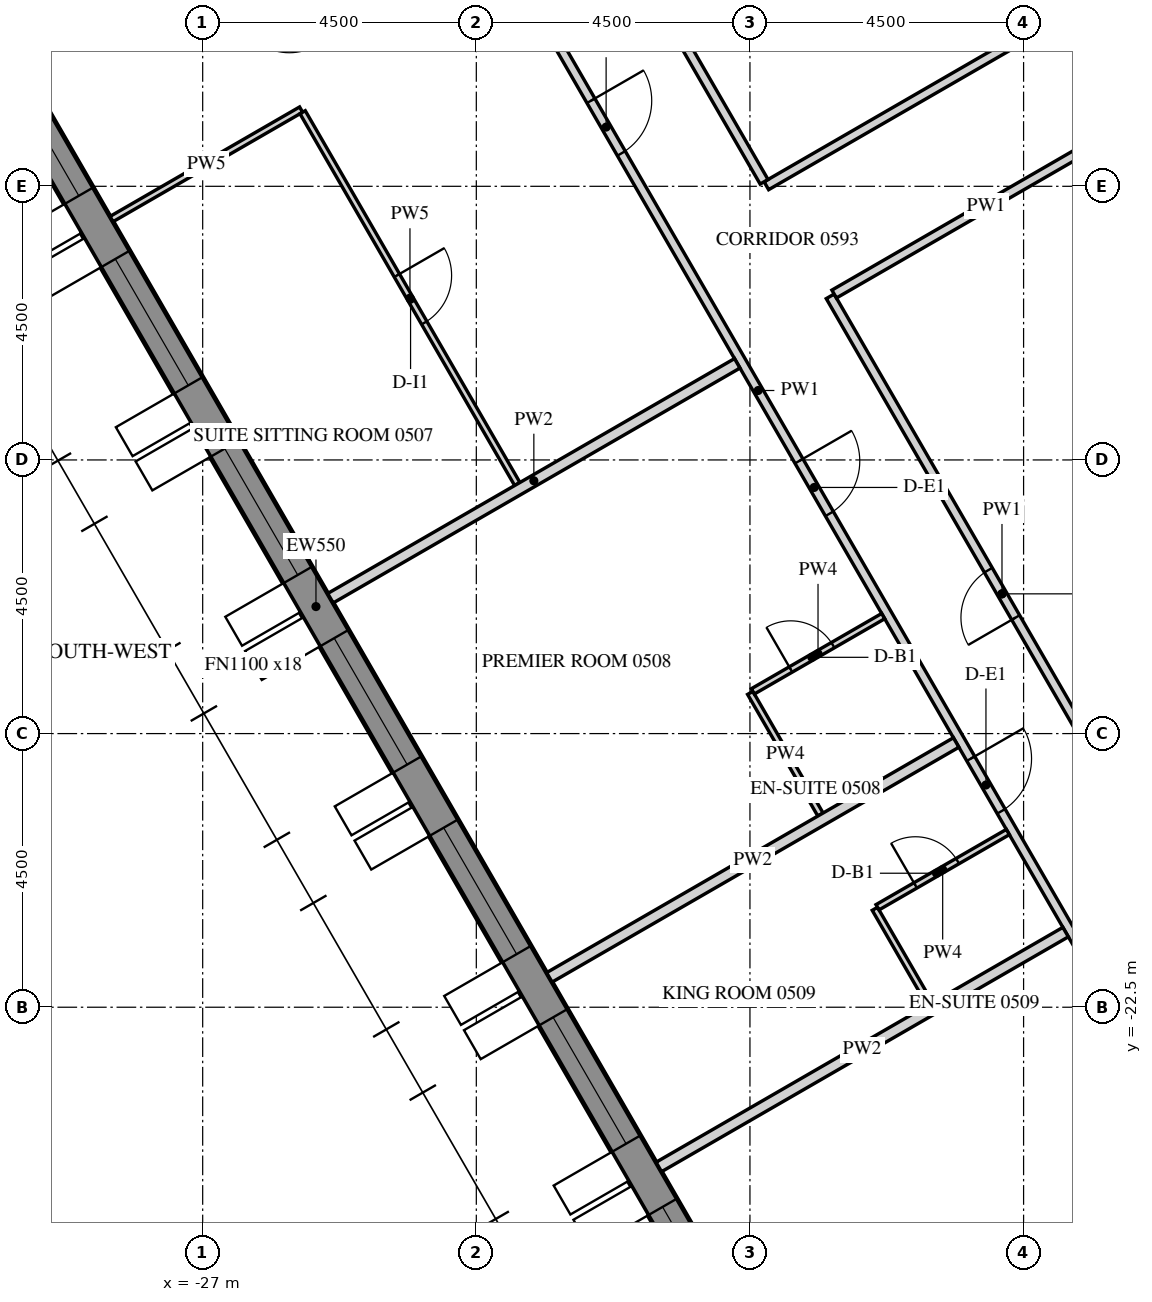
"""IFC4 building model, lengths in metres.
Left out: names, types, materials, properties, quantities, classifications, styles, units other than length and angle.
Written with IfcOpenShell. Run it as: python <this file> out.ifc"""

import sys

from ifc_helpers import new_model, si_unit, direction, frame, frame_2d, origin, place, context, subcontext, project, spatial, polyline, rectangle, outline, extrude, element, fill, save


model = new_model("IFC4")
c1 = context("Model", 3, precision=1e-05, world=origin(), true_north=direction((0.0, 1.0)))
c2 = subcontext(c1, "Body", "Model", "MODEL_VIEW")
j1 = project(units=[si_unit("LENGTHUNIT", "METRE"), si_unit("PLANEANGLEUNIT", "RADIAN")], contexts=[c1])
p1 = place(None, origin())
s1 = spatial("IfcSite", under=j1, at=p1, CompositionType="ELEMENT")
p2 = place(p1, origin())
s2 = spatial("IfcBuilding", under=s1, at=p2, CompositionType="ELEMENT")
p3 = place(p2, frame((0.0, 0.0, 80.4)))
s3 = spatial("IfcBuildingStorey", under=s2, at=p3, CompositionType="ELEMENT", Elevation=80.4)
p4 = place(p3, frame((-32.655, -2.89, -0.15), z_axis=(0.0, 0.0, 1.0), x_axis=(0.499997711317, -0.866026725152, 0.0)))
e1 = element("IfcWall", 1, at=p4, inside=s3, PredefinedType="SOLIDWALL", context=c2, shape_type="SweptSolid", body=[
    extrude(outline(polyline([(-0.022, -0.275), (30.097, -0.275), (30.045, 0.275), (0.022, 0.275), (-0.022, -0.275)])), origin(), (0.0, 0.0, 1.0), 3.9),
])
p5 = place(p4, frame((1.236, 0.0, 1.05)))
e2 = element("IfcOpeningElement", 2, at=p5, cuts=e1, PredefinedType="OPENING", context=c2, shape_type="SweptSolid", body=[
    extrude(rectangle(XDim=2.4, YDim=2.4, at=frame_2d((1.2, 1.2))), frame((0.0, 0.285, 0.0), z_axis=(0.0, -1.0, 0.0), x_axis=(1.0, 0.0, 0.0)), (0.0, 0.0, 1.0), 0.57),
])
p6 = place(p4, frame((4.835, 0.0, 1.05)))
e3 = element("IfcOpeningElement", 3, at=p6, cuts=e1, PredefinedType="OPENING", context=c2, shape_type="SweptSolid", body=[
    extrude(rectangle(XDim=2.4, YDim=2.4, at=frame_2d((1.2, 1.2))), frame((0.0, 0.285, 0.0), z_axis=(0.0, -1.0, 0.0), x_axis=(1.0, 0.0, 0.0)), (0.0, 0.0, 1.0), 0.57),
])
p7 = place(p4, frame((8.436, 0.0, 1.05)))
e4 = element("IfcOpeningElement", 4, at=p7, cuts=e1, PredefinedType="OPENING", context=c2, shape_type="SweptSolid", body=[
    extrude(rectangle(XDim=2.4, YDim=2.4, at=frame_2d((1.2, 1.2))), frame((0.0, 0.285, 0.0), z_axis=(0.0, -1.0, 0.0), x_axis=(1.0, 0.0, 0.0)), (0.0, 0.0, 1.0), 0.57),
])
p8 = place(p4, frame((12.035, 0.0, 1.05)))
e5 = element("IfcOpeningElement", 5, at=p8, cuts=e1, PredefinedType="OPENING", context=c2, shape_type="SweptSolid", body=[
    extrude(rectangle(XDim=2.4, YDim=2.4, at=frame_2d((1.2, 1.2))), frame((0.0, 0.285, 0.0), z_axis=(0.0, -1.0, 0.0), x_axis=(1.0, 0.0, 0.0)), (0.0, 0.0, 1.0), 0.57),
])
p9 = place(p4, frame((15.635, 0.0, 1.05)))
e6 = element("IfcOpeningElement", 6, at=p9, cuts=e1, PredefinedType="OPENING", context=c2, shape_type="SweptSolid", body=[
    extrude(rectangle(XDim=2.4, YDim=2.4, at=frame_2d((1.2, 1.2))), frame((0.0, 0.285, 0.0), z_axis=(0.0, -1.0, 0.0), x_axis=(1.0, 0.0, 0.0)), (0.0, 0.0, 1.0), 0.57),
])
p10 = place(p4, frame((19.236, 0.0, 1.05)))
e7 = element("IfcOpeningElement", 7, at=p10, cuts=e1, PredefinedType="OPENING", context=c2, shape_type="SweptSolid", body=[
    extrude(rectangle(XDim=2.4, YDim=2.4, at=frame_2d((1.2, 1.2))), frame((0.0, 0.285, 0.0), z_axis=(0.0, -1.0, 0.0), x_axis=(1.0, 0.0, 0.0)), (0.0, 0.0, 1.0), 0.57),
])
p11 = place(p4, frame((22.835, 0.0, 1.05)))
e8 = element("IfcOpeningElement", 8, at=p11, cuts=e1, PredefinedType="OPENING", context=c2, shape_type="SweptSolid", body=[
    extrude(rectangle(XDim=2.4, YDim=2.4, at=frame_2d((1.2, 1.2))), frame((0.0, 0.285, 0.0), z_axis=(0.0, -1.0, 0.0), x_axis=(1.0, 0.0, 0.0)), (0.0, 0.0, 1.0), 0.57),
])
p12 = place(p4, frame((26.436, 0.0, 1.05)))
e9 = element("IfcOpeningElement", 9, at=p12, cuts=e1, PredefinedType="OPENING", context=c2, shape_type="SweptSolid", body=[
    extrude(rectangle(XDim=2.4, YDim=2.4, at=frame_2d((1.2, 1.2))), frame((0.0, 0.285, 0.0), z_axis=(0.0, -1.0, 0.0), x_axis=(1.0, 0.0, 0.0)), (0.0, 0.0, 1.0), 0.57),
])
p13 = place(p3, frame((-15.819, 0.0, -0.15), z_axis=(0.0, 0.0, 1.0), x_axis=(0.499999880136, -0.866025472988, 0.0)))
e10 = element("IfcWall", 10, at=p13, inside=s3, PredefinedType="SHEAR", context=c2, shape_type="SweptSolid", body=[
    extrude(outline(polyline([(-0.173, -0.3), (15.993, -0.3), (15.646, 0.3), (0.173, 0.3), (-0.173, -0.3)])), origin(), (0.0, 0.0, 1.0), 3.9),
])
p14 = place(p13, frame((6.981, 0.0, 0.15)))
e11 = element("IfcOpeningElement", 11, at=p14, cuts=e10, PredefinedType="OPENING", context=c2, shape_type="SweptSolid", body=[
    extrude(rectangle(XDim=1.8, YDim=2.4, at=frame_2d((0.9, 1.2))), frame((0.0, 0.31, 0.0), z_axis=(0.0, -1.0, 0.0), x_axis=(1.0, 0.0, 0.0)), (0.0, 0.0, 1.0), 0.62),
])
p15 = place(p3, frame((-23.743, -2.175, 0.0), z_axis=(0.0, 0.0, 1.0), x_axis=(0.499992353047, -0.86602981871, 0.0)))
e12 = element("IfcWall", 12, at=p15, inside=s3, PredefinedType="PARTITIONING", context=c2, shape_type="SweptSolid", body=[
    extrude(rectangle(XDim=23.516, YDim=0.15, at=frame_2d((11.758, 0.0))), origin(), (0.0, 0.0, 1.0), 2.988),
])
p16 = place(p15, frame((6.256, 0.0, 0.0)))
e13 = element("IfcOpeningElement", 13, at=p16, cuts=e12, PredefinedType="OPENING", context=c2, shape_type="SweptSolid", body=[
    extrude(rectangle(XDim=1.0, YDim=2.1, at=frame_2d((0.5, 1.05))), frame((0.0, 0.085, 0.0), z_axis=(0.0, -1.0, 0.0), x_axis=(1.0, 0.0, 0.0)), (0.0, 0.0, 1.0), 0.17),
])
p17 = place(p15, frame((13.099, 0.0, 0.0)))
e14 = element("IfcOpeningElement", 14, at=p17, cuts=e12, PredefinedType="OPENING", context=c2, shape_type="SweptSolid", body=[
    extrude(rectangle(XDim=1.0, YDim=2.1, at=frame_2d((0.5, 1.05))), frame((0.0, 0.085, 0.0), z_axis=(0.0, -1.0, 0.0), x_axis=(1.0, 0.0, 0.0)), (0.0, 0.0, 1.0), 0.17),
])
p18 = place(p15, frame((18.749, 0.0, 0.0)))
e15 = element("IfcOpeningElement", 15, at=p18, cuts=e12, PredefinedType="OPENING", context=c2, shape_type="SweptSolid", body=[
    extrude(rectangle(XDim=1.0, YDim=2.1, at=frame_2d((0.5, 1.05))), frame((0.0, 0.085, 0.0), z_axis=(0.0, -1.0, 0.0), x_axis=(1.0, 0.0, 0.0)), (0.0, 0.0, 1.0), 0.17),
])
p19 = place(p3, frame((-12.664, -6.066, 0.0), z_axis=(0.0, 0.0, 1.0), x_axis=(-0.866018092707, -0.500012662943, 0.0)))
e16 = element("IfcWall", 16, at=p19, inside=s3, PredefinedType="PARTITIONING", context=c2, shape_type="SweptSolid", body=[
    extrude(rectangle(XDim=5.85, YDim=0.15, at=frame_2d((2.925, 0.0))), origin(), (0.0, 0.0, 1.0), 2.988),
])
p20 = place(p3, frame((-17.768, -8.926, 0.0), z_axis=(0.0, 0.0, 1.0), x_axis=(-0.499997033681, 0.866027116383, 0.0)))
e17 = element("IfcWall", 17, at=p20, inside=s3, PredefinedType="PARTITIONING", context=c2, shape_type="SweptSolid", body=[
    extrude(rectangle(XDim=8.235, YDim=0.15, at=frame_2d((4.118, 0.0))), origin(), (0.0, 0.0, 1.0), 2.988),
])
p21 = place(p20, frame((3.668, 0.0, 0.0)))
e18 = element("IfcOpeningElement", 18, at=p21, cuts=e17, PredefinedType="OPENING", context=c2, shape_type="SweptSolid", body=[
    extrude(rectangle(XDim=0.9, YDim=2.1, at=frame_2d((0.45, 1.05))), frame((0.0, 0.085, 0.0), z_axis=(0.0, -1.0, 0.0), x_axis=(1.0, 0.0, 0.0)), (0.0, 0.0, 1.0), 0.17),
])
p22 = place(p3, frame((-11.031, -20.595, 0.0), z_axis=(0.0, 0.0, 1.0), x_axis=(-0.499987422378, 0.866032665356, 0.0)))
e19 = element("IfcWall", 19, at=p22, inside=s3, PredefinedType="PARTITIONING", context=c2, shape_type="SweptSolid", body=[
    extrude(rectangle(XDim=11.299, YDim=0.15, at=frame_2d((5.649, 0.0))), origin(), (0.0, 0.0, 1.0), 2.988),
])
p23 = place(p22, frame((5.199, 0.0, 0.0)))
e20 = element("IfcOpeningElement", 20, at=p23, cuts=e19, PredefinedType="OPENING", context=c2, shape_type="SweptSolid", body=[
    extrude(rectangle(XDim=0.9, YDim=2.1, at=frame_2d((0.45, 1.05))), frame((0.0, 0.085, 0.0), z_axis=(0.0, -1.0, 0.0), x_axis=(1.0, 0.0, 0.0)), (0.0, 0.0, 1.0), 0.17),
])
p24 = place(p3, frame((-16.615, -10.772, 0.0), z_axis=(0.0, 0.0, 1.0), x_axis=(0.866025774745, 0.499999357477, 0.0)))
e21 = element("IfcWall", 21, at=p24, inside=s3, PredefinedType="PARTITIONING", context=c2, shape_type="SweptSolid", body=[
    extrude(rectangle(XDim=5.775, YDim=0.15, at=frame_2d((2.887, 0.0))), origin(), (0.0, 0.0, 1.0), 2.988),
])
p25 = place(p3, frame((-28.499, -9.538, 0.0), z_axis=(0.0, 0.0, 1.0), x_axis=(0.866047807691, 0.499961193289, 0.0)))
e22 = element("IfcWall", 22, at=p25, inside=s3, PredefinedType="PARTITIONING", context=c2, shape_type="SweptSolid", body=[
    extrude(rectangle(XDim=3.6, YDim=0.1, at=frame_2d((1.8, 0.0))), origin(), (0.0, 0.0, 1.0), 2.988),
])
p26 = place(p3, frame((-25.356, -7.782, 0.0), z_axis=(0.0, 0.0, 1.0), x_axis=(0.500010820671, -0.866019156377, 0.0)))
e23 = element("IfcWall", 23, at=p26, inside=s3, PredefinedType="PARTITIONING", context=c2, shape_type="SweptSolid", body=[
    extrude(rectangle(XDim=7.06, YDim=0.1, at=frame_2d((3.53, 0.0))), origin(), (0.0, 0.0, 1.0), 2.988),
])
p27 = place(p26, frame((3.1, 0.0, 0.0)))
e24 = element("IfcOpeningElement", 24, at=p27, cuts=e23, PredefinedType="OPENING", context=c2, shape_type="SweptSolid", body=[
    extrude(rectangle(XDim=0.9, YDim=2.1, at=frame_2d((0.45, 1.05))), frame((0.0, 0.06, 0.0), z_axis=(0.0, -1.0, 0.0), x_axis=(1.0, 0.0, 0.0)), (0.0, 0.0, 1.0), 0.12),
])
p28 = place(p3, frame((-24.899, -15.774, 0.0), z_axis=(0.0, 0.0, 1.0), x_axis=(0.866032958989, 0.499986913773, 0.0)))
e25 = element("IfcWall", 25, at=p28, inside=s3, PredefinedType="PARTITIONING", context=c2, shape_type="SweptSolid", body=[
    extrude(rectangle(XDim=7.725, YDim=0.18, at=frame_2d((3.862, 0.0))), origin(), (0.0, 0.0, 1.0), 2.988),
])
p29 = place(p3, frame((-16.841, -19.331, 0.0), z_axis=(0.0, 0.0, 1.0), x_axis=(-0.500015210774, 0.866016621662, 0.0)))
e26 = element("IfcWall", 26, at=p29, inside=s3, PredefinedType="PARTITIONING", context=c2, shape_type="SweptSolid", body=[
    extrude(rectangle(XDim=2.31, YDim=0.1, at=frame_2d((1.155, 0.0))), origin(), (0.0, 0.0, 1.0), 2.988),
])
p30 = place(p3, frame((-17.952, -17.306, 0.0), z_axis=(0.0, 0.0, 1.0), x_axis=(0.866031185235, 0.4999899861, 0.0)))
e27 = element("IfcWall", 27, at=p30, inside=s3, PredefinedType="PARTITIONING", context=c2, shape_type="SweptSolid", body=[
    extrude(rectangle(XDim=2.475, YDim=0.1, at=frame_2d((1.238, 0.0))), origin(), (0.0, 0.0, 1.0), 2.988),
])
p31 = place(p30, frame((0.72, 0.0, 0.0)))
e28 = element("IfcOpeningElement", 28, at=p31, cuts=e27, PredefinedType="OPENING", context=c2, shape_type="SweptSolid", body=[
    extrude(rectangle(XDim=0.8, YDim=2.1, at=frame_2d((0.4, 1.05))), frame((0.0, 0.06, 0.0), z_axis=(0.0, -1.0, 0.0), x_axis=(1.0, 0.0, 0.0)), (0.0, 0.0, 1.0), 0.12),
])
p32 = place(p3, frame((-21.299, -22.009, 0.0), z_axis=(0.0, 0.0, 1.0), x_axis=(0.866019273868, 0.500010617176, 0.0)))
e29 = element("IfcWall", 29, at=p32, inside=s3, PredefinedType="PARTITIONING", context=c2, shape_type="SweptSolid", body=[
    extrude(rectangle(XDim=7.725, YDim=0.18, at=frame_2d((3.862, 0.0))), origin(), (0.0, 0.0, 1.0), 2.988),
])
p33 = place(p3, frame((-15.041, -22.449, 0.0), z_axis=(0.0, 0.0, 1.0), x_axis=(-0.499983199978, 0.866035103064, 0.0)))
e30 = element("IfcWall", 30, at=p33, inside=s3, PredefinedType="PARTITIONING", context=c2, shape_type="SweptSolid", body=[
    extrude(rectangle(XDim=1.81, YDim=0.1, at=frame_2d((0.905, 0.0))), origin(), (0.0, 0.0, 1.0), 2.988),
])
p34 = place(p3, frame((-15.902, -20.856, 0.0), z_axis=(0.0, 0.0, 1.0), x_axis=(0.866031185235, 0.4999899861, 0.0)))
e31 = element("IfcWall", 31, at=p34, inside=s3, PredefinedType="PARTITIONING", context=c2, shape_type="SweptSolid", body=[
    extrude(rectangle(XDim=2.475, YDim=0.1, at=frame_2d((1.238, 0.0))), origin(), (0.0, 0.0, 1.0), 2.988),
])
p35 = place(p34, frame((0.72, 0.0, 0.0)))
e32 = element("IfcOpeningElement", 32, at=p35, cuts=e31, PredefinedType="OPENING", context=c2, shape_type="SweptSolid", body=[
    extrude(rectangle(XDim=0.8, YDim=2.1, at=frame_2d((0.4, 1.05))), frame((0.0, 0.06, 0.0), z_axis=(0.0, -1.0, 0.0), x_axis=(1.0, 0.0, 0.0)), (0.0, 0.0, 1.0), 0.12),
])
p36 = place(p3, frame((-19.499, -25.127, 0.0), z_axis=(0.0, 0.0, 1.0), x_axis=(0.866027174938, 0.499996932259, 0.0)))
e33 = element("IfcWall", 33, at=p36, inside=s3, PredefinedType="PARTITIONING", context=c2, shape_type="SweptSolid", body=[
    extrude(rectangle(XDim=7.725, YDim=0.18, at=frame_2d((3.863, 0.0))), origin(), (0.0, 0.0, 1.0), 2.988),
])
p37 = place(p6, frame((0.0, 0.205, 0.0)))
e34 = element("IfcWindow", 34, at=p37, inside=s3, PartitioningType="DOUBLE_PANEL_VERTICAL", PredefinedType="WINDOW", context=c2, shape_type="SweptSolid", body=[
    extrude(rectangle(XDim=2.4, YDim=2.4, at=frame_2d((1.2, 1.2))), frame((0.0, 0.03, 0.0), z_axis=(0.0, -1.0, 0.0), x_axis=(1.0, 0.0, 0.0)), (0.0, 0.0, 1.0), 0.06),
])
fill(e3, e34)
p38 = place(p7, frame((0.0, 0.205, 0.0)))
e35 = element("IfcWindow", 35, at=p38, inside=s3, PartitioningType="DOUBLE_PANEL_VERTICAL", PredefinedType="WINDOW", context=c2, shape_type="SweptSolid", body=[
    extrude(rectangle(XDim=2.4, YDim=2.4, at=frame_2d((1.2, 1.2))), frame((0.0, 0.03, 0.0), z_axis=(0.0, -1.0, 0.0), x_axis=(1.0, 0.0, 0.0)), (0.0, 0.0, 1.0), 0.06),
])
fill(e4, e35)
p39 = place(p8, frame((0.0, 0.205, 0.0)))
e36 = element("IfcWindow", 36, at=p39, inside=s3, PartitioningType="DOUBLE_PANEL_VERTICAL", PredefinedType="WINDOW", context=c2, shape_type="SweptSolid", body=[
    extrude(rectangle(XDim=2.4, YDim=2.4, at=frame_2d((1.2, 1.2))), frame((0.0, 0.03, 0.0), z_axis=(0.0, -1.0, 0.0), x_axis=(1.0, 0.0, 0.0)), (0.0, 0.0, 1.0), 0.06),
])
fill(e5, e36)
p40 = place(p9, frame((0.0, 0.205, 0.0)))
e37 = element("IfcWindow", 37, at=p40, inside=s3, PartitioningType="DOUBLE_PANEL_VERTICAL", PredefinedType="WINDOW", context=c2, shape_type="SweptSolid", body=[
    extrude(rectangle(XDim=2.4, YDim=2.4, at=frame_2d((1.2, 1.2))), frame((0.0, 0.03, 0.0), z_axis=(0.0, -1.0, 0.0), x_axis=(1.0, 0.0, 0.0)), (0.0, 0.0, 1.0), 0.06),
])
fill(e6, e37)
p41 = place(p10, frame((0.0, 0.205, 0.0)))
e38 = element("IfcWindow", 38, at=p41, inside=s3, PartitioningType="DOUBLE_PANEL_VERTICAL", PredefinedType="WINDOW", context=c2, shape_type="SweptSolid", body=[
    extrude(rectangle(XDim=2.4, YDim=2.4, at=frame_2d((1.2, 1.2))), frame((0.0, 0.03, 0.0), z_axis=(0.0, -1.0, 0.0), x_axis=(1.0, 0.0, 0.0)), (0.0, 0.0, 1.0), 0.06),
])
fill(e7, e38)
p42 = place(p11, frame((0.0, 0.205, 0.0)))
e39 = element("IfcWindow", 39, at=p42, inside=s3, PartitioningType="DOUBLE_PANEL_VERTICAL", PredefinedType="WINDOW", context=c2, shape_type="SweptSolid", body=[
    extrude(rectangle(XDim=2.4, YDim=2.4, at=frame_2d((1.2, 1.2))), frame((0.0, 0.03, 0.0), z_axis=(0.0, -1.0, 0.0), x_axis=(1.0, 0.0, 0.0)), (0.0, 0.0, 1.0), 0.06),
])
fill(e8, e39)
p43 = place(p12, frame((0.0, 0.205, 0.0)))
e40 = element("IfcWindow", 40, at=p43, inside=s3, PartitioningType="DOUBLE_PANEL_VERTICAL", PredefinedType="WINDOW", context=c2, shape_type="SweptSolid", body=[
    extrude(rectangle(XDim=2.4, YDim=2.4, at=frame_2d((1.2, 1.2))), frame((0.0, 0.03, 0.0), z_axis=(0.0, -1.0, 0.0), x_axis=(1.0, 0.0, 0.0)), (0.0, 0.0, 1.0), 0.06),
])
fill(e9, e40)
p44 = place(p16, origin())
e41 = element("IfcDoor", 41, at=p44, inside=s3, OperationType="SINGLE_SWING_LEFT", PredefinedType="DOOR", context=c2, shape_type="SweptSolid", body=[
    extrude(rectangle(XDim=1.0, YDim=2.1, at=frame_2d((0.5, 1.05))), frame((0.0, 0.025, 0.0), z_axis=(0.0, -1.0, 0.0), x_axis=(1.0, 0.0, 0.0)), (0.0, 0.0, 1.0), 0.05),
])
fill(e13, e41)
p45 = place(p27, origin())
e42 = element("IfcDoor", 42, at=p45, inside=s3, OperationType="SINGLE_SWING_LEFT", PredefinedType="DOOR", context=c2, shape_type="SweptSolid", body=[
    extrude(rectangle(XDim=0.9, YDim=2.1, at=frame_2d((0.45, 1.05))), frame((0.0, 0.025, 0.0), z_axis=(0.0, -1.0, 0.0), x_axis=(1.0, 0.0, 0.0)), (0.0, 0.0, 1.0), 0.05),
])
fill(e24, e42)
p46 = place(p17, origin())
e43 = element("IfcDoor", 43, at=p46, inside=s3, OperationType="SINGLE_SWING_LEFT", PredefinedType="DOOR", context=c2, shape_type="SweptSolid", body=[
    extrude(rectangle(XDim=1.0, YDim=2.1, at=frame_2d((0.5, 1.05))), frame((0.0, 0.025, 0.0), z_axis=(0.0, -1.0, 0.0), x_axis=(1.0, 0.0, 0.0)), (0.0, 0.0, 1.0), 0.05),
])
fill(e14, e43)
p47 = place(p31, origin())
e44 = element("IfcDoor", 44, at=p47, inside=s3, OperationType="SINGLE_SWING_RIGHT", PredefinedType="DOOR", context=c2, shape_type="SweptSolid", body=[
    extrude(rectangle(XDim=0.8, YDim=2.1, at=frame_2d((0.4, 1.05))), frame((0.0, 0.025, 0.0), z_axis=(0.0, -1.0, 0.0), x_axis=(1.0, 0.0, 0.0)), (0.0, 0.0, 1.0), 0.05),
])
fill(e28, e44)
p48 = place(p18, origin())
e45 = element("IfcDoor", 45, at=p48, inside=s3, OperationType="SINGLE_SWING_RIGHT", PredefinedType="DOOR", context=c2, shape_type="SweptSolid", body=[
    extrude(rectangle(XDim=1.0, YDim=2.1, at=frame_2d((0.5, 1.05))), frame((0.0, 0.025, 0.0), z_axis=(0.0, -1.0, 0.0), x_axis=(1.0, 0.0, 0.0)), (0.0, 0.0, 1.0), 0.05),
])
fill(e15, e45)
p49 = place(p35, origin())
e46 = element("IfcDoor", 46, at=p49, inside=s3, OperationType="SINGLE_SWING_RIGHT", PredefinedType="DOOR", context=c2, shape_type="SweptSolid", body=[
    extrude(rectangle(XDim=0.8, YDim=2.1, at=frame_2d((0.4, 1.05))), frame((0.0, 0.025, 0.0), z_axis=(0.0, -1.0, 0.0), x_axis=(1.0, 0.0, 0.0)), (0.0, 0.0, 1.0), 0.05),
])
fill(e32, e46)
p50 = place(p23, origin())
e47 = element("IfcDoor", 47, at=p50, inside=s3, OperationType="SINGLE_SWING_RIGHT", PredefinedType="DOOR", context=c2, shape_type="SweptSolid", body=[
    extrude(rectangle(XDim=0.9, YDim=2.1, at=frame_2d((0.45, 1.05))), frame((0.0, 0.025, 0.0), z_axis=(0.0, -1.0, 0.0), x_axis=(1.0, 0.0, 0.0)), (0.0, 0.0, 1.0), 0.05),
])
fill(e20, e47)
save(model, sys.argv[1])
